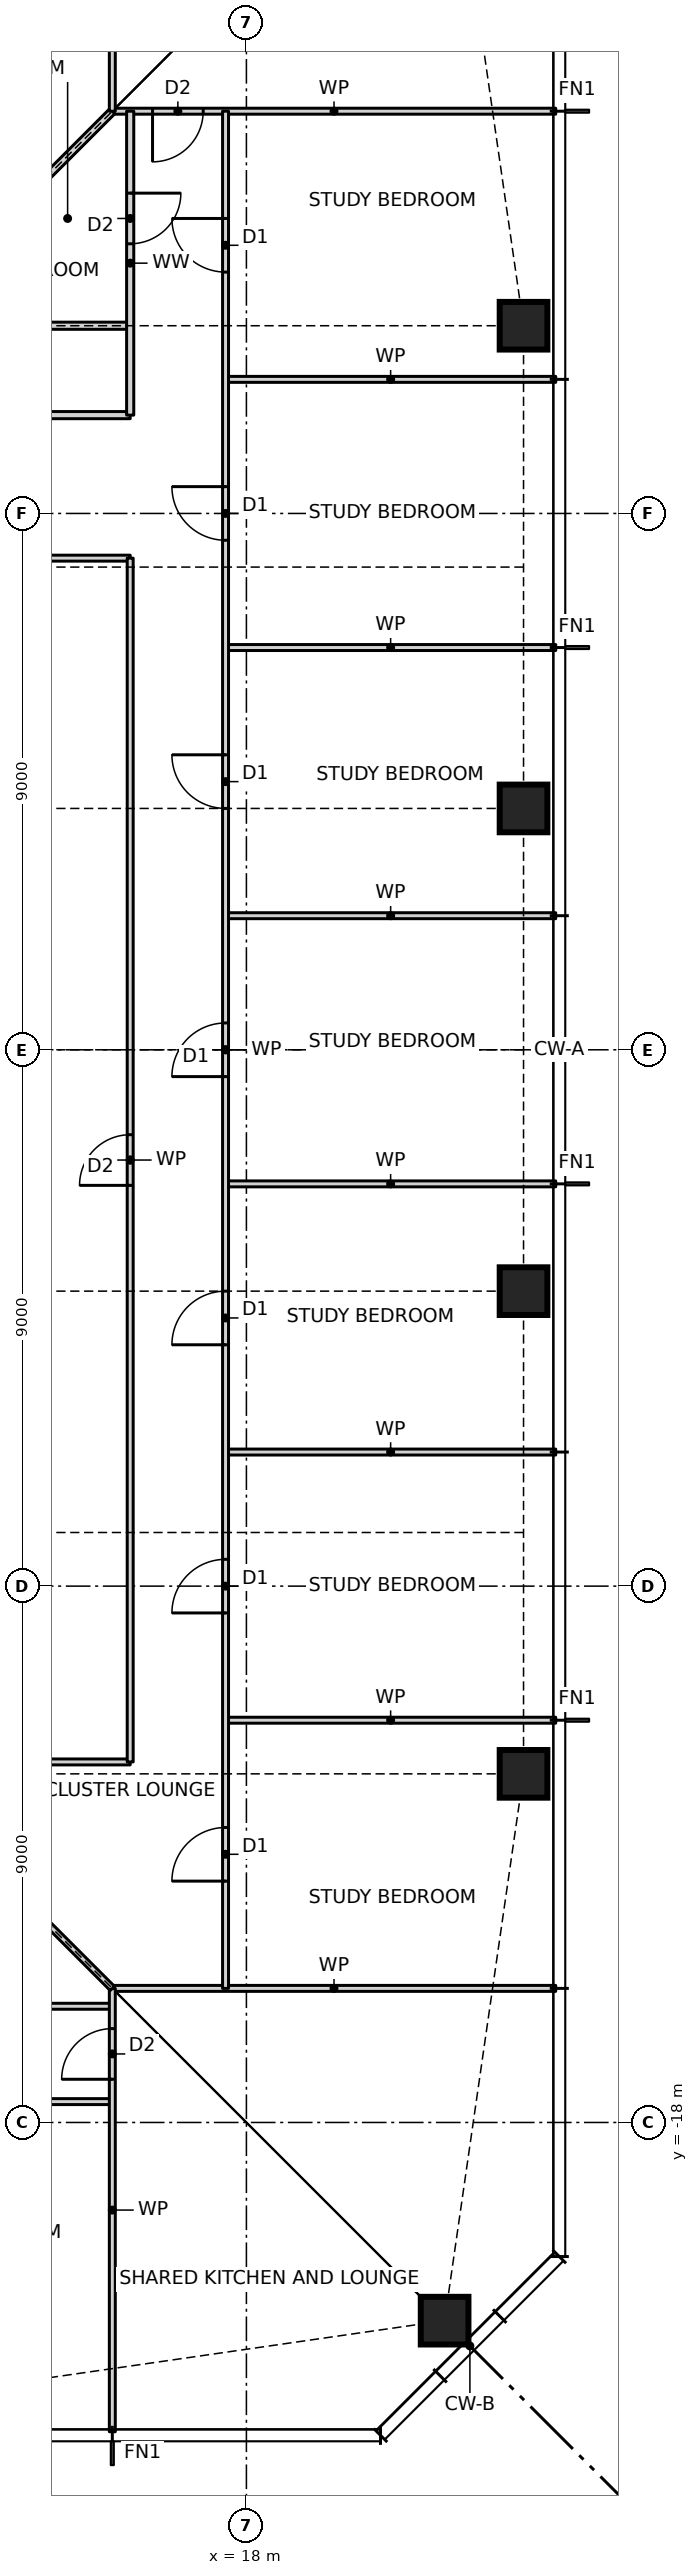
"""IFC4 building model, lengths in metres.
Left out: names, types, materials, properties, quantities, classifications, styles, units other than length and angle.
Written with IfcOpenShell. Run it as: python <this file> out.ifc"""

import sys

from ifc_helpers import new_model, si_unit, direction, frame, frame_2d, origin, origin_2d, place, context, subcontext, project, spatial, rectangle, hollow_rectangle, extrude, element, fill, save


model = new_model("IFC4")
c1 = context("Model", 3, precision=1e-05, world=origin(), true_north=direction((0.0, 1.0)))
c2 = subcontext(c1, "Body", "Model", "MODEL_VIEW")
j1 = project(units=[si_unit("LENGTHUNIT", "METRE"), si_unit("PLANEANGLEUNIT", "RADIAN")], contexts=[c1])
p1 = place(None, origin())
s1 = spatial("IfcSite", under=j1, at=p1, CompositionType="ELEMENT")
p2 = place(p1, origin())
s2 = spatial("IfcBuilding", under=s1, at=p2, CompositionType="ELEMENT")
p3 = place(p2, frame((0.0, 0.0, 18.5)))
s3 = spatial("IfcBuildingStorey", under=s2, at=p3, CompositionType="ELEMENT", Elevation=18.5)
for number, where, z_axis, x_axis in (
    (1, (21.326, -21.326, 0.0), (0.0, 0.0, 1.0), (1.0, 0.0, 0.0)),
    (2, (22.65, -12.15, 0.0), (0.0, 0.0, 1.0), (1.0, 0.0, 0.0)),
    (3, (22.65, -4.05, 0.0), (0.0, 0.0, 1.0), (1.0, 0.0, 0.0)),
    (4, (22.65, 4.05, 0.0), (0.0, 0.0, 1.0), (1.0, 0.0, 0.0)),
    (5, (22.65, 12.15, 0.0), (0.0, 0.0, 1.0), (1.0, 0.0, 0.0)),
):
    element("IfcColumn", number, at=place(p3, frame(where, z_axis=z_axis, x_axis=x_axis)), inside=s3, PredefinedType="COLUMN", context=c2, shape_type="SweptSolid", body=[
        extrude(hollow_rectangle(XDim=0.8, YDim=0.8, WallThickness=0.09, at=origin_2d()), origin(), (0.0, 0.0, 1.0), 3.5),
    ])
p4 = place(p3, frame((-15.75, -17.65, 0.0), z_axis=(0.0, 0.0, 1.0), x_axis=(1.0, 0.0, 0.0)))
e6 = element("IfcWall", 6, at=p4, inside=s3, PredefinedType="PARTITIONING", context=c2, shape_type="SweptSolid", body=[
    extrude(rectangle(XDim=31.5, YDim=0.1, at=frame_2d((15.75, 0.0))), origin(), (0.0, 0.0, 1.0), 3.27),
])
p5 = place(p4, frame((1.8, 0.0, 0.0)))
e7 = element("IfcOpeningElement", 7, at=p5, cuts=e6, PredefinedType="OPENING", context=c2, shape_type="SweptSolid", body=[
    extrude(rectangle(XDim=0.9, YDim=2.1, at=frame_2d((0.45, 1.05))), frame((0.0, 0.06, 0.0), z_axis=(0.0, -1.0, 0.0), x_axis=(1.0, 0.0, 0.0)), (0.0, 0.0, 1.0), 0.12),
])
p6 = place(p4, frame((6.3, 0.0, 0.0)))
e8 = element("IfcOpeningElement", 8, at=p6, cuts=e6, PredefinedType="OPENING", context=c2, shape_type="SweptSolid", body=[
    extrude(rectangle(XDim=0.9, YDim=2.1, at=frame_2d((0.45, 1.05))), frame((0.0, 0.06, 0.0), z_axis=(0.0, -1.0, 0.0), x_axis=(1.0, 0.0, 0.0)), (0.0, 0.0, 1.0), 0.12),
])
p7 = place(p4, frame((10.8, 0.0, 0.0)))
e9 = element("IfcOpeningElement", 9, at=p7, cuts=e6, PredefinedType="OPENING", context=c2, shape_type="SweptSolid", body=[
    extrude(rectangle(XDim=0.9, YDim=2.1, at=frame_2d((0.45, 1.05))), frame((0.0, 0.06, 0.0), z_axis=(0.0, -1.0, 0.0), x_axis=(1.0, 0.0, 0.0)), (0.0, 0.0, 1.0), 0.12),
])
p8 = place(p4, frame((15.3, 0.0, 0.0)))
e10 = element("IfcOpeningElement", 10, at=p8, cuts=e6, PredefinedType="OPENING", context=c2, shape_type="SweptSolid", body=[
    extrude(rectangle(XDim=0.9, YDim=2.1, at=frame_2d((0.45, 1.05))), frame((0.0, 0.06, 0.0), z_axis=(0.0, -1.0, 0.0), x_axis=(1.0, 0.0, 0.0)), (0.0, 0.0, 1.0), 0.12),
])
p9 = place(p4, frame((19.8, 0.0, 0.0)))
e11 = element("IfcOpeningElement", 11, at=p9, cuts=e6, PredefinedType="OPENING", context=c2, shape_type="SweptSolid", body=[
    extrude(rectangle(XDim=0.9, YDim=2.1, at=frame_2d((0.45, 1.05))), frame((0.0, 0.06, 0.0), z_axis=(0.0, -1.0, 0.0), x_axis=(1.0, 0.0, 0.0)), (0.0, 0.0, 1.0), 0.12),
])
p10 = place(p4, frame((24.3, 0.0, 0.0)))
e12 = element("IfcOpeningElement", 12, at=p10, cuts=e6, PredefinedType="OPENING", context=c2, shape_type="SweptSolid", body=[
    extrude(rectangle(XDim=0.9, YDim=2.1, at=frame_2d((0.45, 1.05))), frame((0.0, 0.06, 0.0), z_axis=(0.0, -1.0, 0.0), x_axis=(1.0, 0.0, 0.0)), (0.0, 0.0, 1.0), 0.12),
])
p11 = place(p4, frame((28.8, 0.0, 0.0)))
e13 = element("IfcOpeningElement", 13, at=p11, cuts=e6, PredefinedType="OPENING", context=c2, shape_type="SweptSolid", body=[
    extrude(rectangle(XDim=0.9, YDim=2.1, at=frame_2d((0.45, 1.05))), frame((0.0, 0.06, 0.0), z_axis=(0.0, -1.0, 0.0), x_axis=(1.0, 0.0, 0.0)), (0.0, 0.0, 1.0), 0.12),
])
p12 = place(p3, frame((-2.15, -16.05, 0.0), z_axis=(0.0, 0.0, 1.0), x_axis=(1.0, 0.0, 0.0)))
e14 = element("IfcWall", 14, at=p12, inside=s3, PredefinedType="PARTITIONING", context=c2, shape_type="SweptSolid", body=[
    extrude(rectangle(XDim=17.9, YDim=0.1, at=frame_2d((8.95, 0.0))), origin(), (0.0, 0.0, 1.0), 3.27),
])
p13 = place(p12, frame((8.525, 0.0, 0.0)))
e15 = element("IfcOpeningElement", 15, at=p13, cuts=e14, PredefinedType="OPENING", context=c2, shape_type="SweptSolid", body=[
    extrude(rectangle(XDim=0.85, YDim=2.1, at=frame_2d((0.425, 1.05))), frame((0.0, 0.06, 0.0), z_axis=(0.0, -1.0, 0.0), x_axis=(1.0, 0.0, 0.0)), (0.0, 0.0, 1.0), 0.12),
])
p14 = place(p3, frame((15.75, -15.75, 0.0), z_axis=(0.0, 0.0, 1.0), x_axis=(1.0, 0.0, 0.0)))
e16 = element("IfcWall", 16, at=p14, inside=s3, PredefinedType="PARTITIONING", context=c2, shape_type="SweptSolid", body=[
    extrude(rectangle(XDim=7.44, YDim=0.1, at=frame_2d((3.72, 0.0))), origin(), (0.0, 0.0, 1.0), 3.27),
])
p15 = place(p3, frame((11.95, -11.95, 0.0), z_axis=(0.0, 0.0, 1.0), x_axis=(1.0, 0.0, 0.0)))
e17 = element("IfcWall", 17, at=p15, inside=s3, PredefinedType="PARTITIONING", context=c2, shape_type="SweptSolid", body=[
    extrude(rectangle(XDim=4.1, YDim=0.1, at=frame_2d((2.05, 0.0))), origin(), (0.0, 0.0, 1.0), 3.27),
])
for number, where, z_axis, x_axis in (
    (18, (17.65, -11.25, 0.0), (0.0, 0.0, 1.0), (1.0, 0.0, 0.0)),
    (19, (17.65, -6.75, 0.0), (0.0, 0.0, 1.0), (1.0, 0.0, 0.0)),
    (20, (17.65, -2.25, 0.0), (0.0, 0.0, 1.0), (1.0, 0.0, 0.0)),
    (21, (17.65, 2.25, 0.0), (0.0, 0.0, 1.0), (1.0, 0.0, 0.0)),
    (22, (17.65, 6.75, 0.0), (0.0, 0.0, 1.0), (1.0, 0.0, 0.0)),
):
    element("IfcWall", number, at=place(p3, frame(where, z_axis=z_axis, x_axis=x_axis)), inside=s3, PredefinedType="PARTITIONING", context=c2, shape_type="SweptSolid", body=[
        extrude(rectangle(XDim=5.54, YDim=0.1, at=frame_2d((2.77, 0.0))), origin(), (0.0, 0.0, 1.0), 3.27),
    ])
p16 = place(p3, frame((11.6, 8.25, 0.0), z_axis=(0.0, 0.0, 1.0), x_axis=(1.0, 0.0, 0.0)))
e23 = element("IfcWall", 23, at=p16, inside=s3, PredefinedType="PARTITIONING", context=c2, shape_type="SweptSolid", body=[
    extrude(rectangle(XDim=4.45, YDim=0.1, at=frame_2d((2.225, 0.0))), origin(), (0.0, 0.0, 1.0), 3.27),
])
p17 = place(p3, frame((11.6, 10.65, 0.0), z_axis=(0.0, 0.0, 1.0), x_axis=(1.0, 0.0, 0.0)))
e24 = element("IfcWall", 24, at=p17, inside=s3, PredefinedType="PARTITIONING", context=c2, shape_type="SweptSolid", body=[
    extrude(rectangle(XDim=4.45, YDim=0.12, at=frame_2d((2.225, 0.0))), origin(), (0.0, 0.0, 1.0), 3.27),
])
p18 = place(p17, frame((1.8, 0.0, 0.0)))
e25 = element("IfcOpeningElement", 25, at=p18, cuts=e24, PredefinedType="OPENING", context=c2, shape_type="SweptSolid", body=[
    extrude(rectangle(XDim=0.85, YDim=2.1, at=frame_2d((0.425, 1.05))), frame((0.0, 0.07, 0.0), z_axis=(0.0, -1.0, 0.0), x_axis=(1.0, 0.0, 0.0)), (0.0, 0.0, 1.0), 0.14),
])
p19 = place(p3, frame((17.65, 11.25, 0.0), z_axis=(0.0, 0.0, 1.0), x_axis=(1.0, 0.0, 0.0)))
e26 = element("IfcWall", 26, at=p19, inside=s3, PredefinedType="PARTITIONING", context=c2, shape_type="SweptSolid", body=[
    extrude(rectangle(XDim=5.54, YDim=0.1, at=frame_2d((2.77, 0.0))), origin(), (0.0, 0.0, 1.0), 3.27),
])
p20 = place(p3, frame((12.15, 12.15, 0.0), z_axis=(0.0, 0.0, 1.0), x_axis=(1.0, 0.0, 0.0)))
e27 = element("IfcWall", 27, at=p20, inside=s3, PredefinedType="PARTITIONING", context=c2, shape_type="SweptSolid", body=[
    extrude(rectangle(XDim=3.9, YDim=0.12, at=frame_2d((1.95, 0.0))), origin(), (0.0, 0.0, 1.0), 2.508),
])
p21 = place(p3, frame((15.75, 15.75, 0.0), z_axis=(0.0, 0.0, 1.0), x_axis=(1.0, 0.0, 0.0)))
e28 = element("IfcWall", 28, at=p21, inside=s3, PredefinedType="PARTITIONING", context=c2, shape_type="SweptSolid", body=[
    extrude(rectangle(XDim=7.44, YDim=0.1, at=frame_2d((3.72, 0.0))), origin(), (0.0, 0.0, 1.0), 3.27),
])
p22 = place(p21, frame((0.675, 0.0, 0.0)))
e29 = element("IfcOpeningElement", 29, at=p22, cuts=e28, PredefinedType="OPENING", context=c2, shape_type="SweptSolid", body=[
    extrude(rectangle(XDim=0.85, YDim=2.1, at=frame_2d((0.425, 1.05))), frame((0.0, 0.06, 0.0), z_axis=(0.0, -1.0, 0.0), x_axis=(1.0, 0.0, 0.0)), (0.0, 0.0, 1.0), 0.12),
])
p23 = place(p3, frame((11.6, 11.6, 0.0), z_axis=(0.0, 0.0, 1.0), x_axis=(0.707106781187, 0.707106781187, 0.0)))
e30 = element("IfcWall", 30, at=p23, inside=s3, PredefinedType="PARTITIONING", context=c2, shape_type="SweptSolid", body=[
    extrude(rectangle(XDim=5.869, YDim=0.12, at=frame_2d((2.935, 0.0))), origin(), (0.0, 0.0, 1.0), 2.343),
])
p24 = place(p3, frame((17.65, -15.75, 0.0), z_axis=(0.0, 0.0, 1.0), x_axis=(0.0, 1.0, 0.0)))
e31 = element("IfcWall", 31, at=p24, inside=s3, PredefinedType="PARTITIONING", context=c2, shape_type="SweptSolid", body=[
    extrude(rectangle(XDim=31.5, YDim=0.1, at=frame_2d((15.75, 0.0))), origin(), (0.0, 0.0, 1.0), 3.27),
])
p25 = place(p24, frame((1.8, 0.0, 0.0)))
e32 = element("IfcOpeningElement", 32, at=p25, cuts=e31, PredefinedType="OPENING", context=c2, shape_type="SweptSolid", body=[
    extrude(rectangle(XDim=0.9, YDim=2.1, at=frame_2d((0.45, 1.05))), frame((0.0, 0.06, 0.0), z_axis=(0.0, -1.0, 0.0), x_axis=(1.0, 0.0, 0.0)), (0.0, 0.0, 1.0), 0.12),
])
p26 = place(p24, frame((6.3, 0.0, 0.0)))
e33 = element("IfcOpeningElement", 33, at=p26, cuts=e31, PredefinedType="OPENING", context=c2, shape_type="SweptSolid", body=[
    extrude(rectangle(XDim=0.9, YDim=2.1, at=frame_2d((0.45, 1.05))), frame((0.0, 0.06, 0.0), z_axis=(0.0, -1.0, 0.0), x_axis=(1.0, 0.0, 0.0)), (0.0, 0.0, 1.0), 0.12),
])
p27 = place(p24, frame((10.8, 0.0, 0.0)))
e34 = element("IfcOpeningElement", 34, at=p27, cuts=e31, PredefinedType="OPENING", context=c2, shape_type="SweptSolid", body=[
    extrude(rectangle(XDim=0.9, YDim=2.1, at=frame_2d((0.45, 1.05))), frame((0.0, 0.06, 0.0), z_axis=(0.0, -1.0, 0.0), x_axis=(1.0, 0.0, 0.0)), (0.0, 0.0, 1.0), 0.12),
])
p28 = place(p24, frame((15.3, 0.0, 0.0)))
e35 = element("IfcOpeningElement", 35, at=p28, cuts=e31, PredefinedType="OPENING", context=c2, shape_type="SweptSolid", body=[
    extrude(rectangle(XDim=0.9, YDim=2.1, at=frame_2d((0.45, 1.05))), frame((0.0, 0.06, 0.0), z_axis=(0.0, -1.0, 0.0), x_axis=(1.0, 0.0, 0.0)), (0.0, 0.0, 1.0), 0.12),
])
p29 = place(p24, frame((19.8, 0.0, 0.0)))
e36 = element("IfcOpeningElement", 36, at=p29, cuts=e31, PredefinedType="OPENING", context=c2, shape_type="SweptSolid", body=[
    extrude(rectangle(XDim=0.9, YDim=2.1, at=frame_2d((0.45, 1.05))), frame((0.0, 0.06, 0.0), z_axis=(0.0, -1.0, 0.0), x_axis=(1.0, 0.0, 0.0)), (0.0, 0.0, 1.0), 0.12),
])
p30 = place(p24, frame((24.3, 0.0, 0.0)))
e37 = element("IfcOpeningElement", 37, at=p30, cuts=e31, PredefinedType="OPENING", context=c2, shape_type="SweptSolid", body=[
    extrude(rectangle(XDim=0.9, YDim=2.1, at=frame_2d((0.45, 1.05))), frame((0.0, 0.06, 0.0), z_axis=(0.0, -1.0, 0.0), x_axis=(1.0, 0.0, 0.0)), (0.0, 0.0, 1.0), 0.12),
])
p31 = place(p24, frame((28.8, 0.0, 0.0)))
e38 = element("IfcOpeningElement", 38, at=p31, cuts=e31, PredefinedType="OPENING", context=c2, shape_type="SweptSolid", body=[
    extrude(rectangle(XDim=0.9, YDim=2.1, at=frame_2d((0.45, 1.05))), frame((0.0, 0.06, 0.0), z_axis=(0.0, -1.0, 0.0), x_axis=(1.0, 0.0, 0.0)), (0.0, 0.0, 1.0), 0.12),
])
p32 = place(p3, frame((16.05, -11.95, 0.0), z_axis=(0.0, 0.0, 1.0), x_axis=(0.0, 1.0, 0.0)))
e39 = element("IfcWall", 39, at=p32, inside=s3, PredefinedType="PARTITIONING", context=c2, shape_type="SweptSolid", body=[
    extrude(rectangle(XDim=20.2, YDim=0.1, at=frame_2d((10.1, 0.0))), origin(), (0.0, 0.0, 1.0), 3.27),
])
p33 = place(p32, frame((9.675, 0.0, 0.0)))
e40 = element("IfcOpeningElement", 40, at=p33, cuts=e39, PredefinedType="OPENING", context=c2, shape_type="SweptSolid", body=[
    extrude(rectangle(XDim=0.85, YDim=2.1, at=frame_2d((0.425, 1.05))), frame((0.0, 0.06, 0.0), z_axis=(0.0, -1.0, 0.0), x_axis=(1.0, 0.0, 0.0)), (0.0, 0.0, 1.0), 0.12),
])
p34 = place(p3, frame((16.05, 10.65, 0.0), z_axis=(0.0, 0.0, 1.0), x_axis=(0.0, 1.0, 0.0)))
e41 = element("IfcWall", 41, at=p34, inside=s3, PredefinedType="PARTITIONING", context=c2, shape_type="SweptSolid", body=[
    extrude(rectangle(XDim=5.1, YDim=0.12, at=frame_2d((2.55, 0.0))), origin(), (0.0, 0.0, 1.0), 3.27),
])
p35 = place(p34, frame((2.875, 0.0, 0.0)))
e42 = element("IfcOpeningElement", 42, at=p35, cuts=e41, PredefinedType="OPENING", context=c2, shape_type="SweptSolid", body=[
    extrude(rectangle(XDim=0.85, YDim=2.1, at=frame_2d((0.425, 1.05))), frame((0.0, 0.07, 0.0), z_axis=(0.0, -1.0, 0.0), x_axis=(1.0, 0.0, 0.0)), (0.0, 0.0, 1.0), 0.14),
])
p36 = place(p3, frame((15.75, -23.19, 0.0), z_axis=(0.0, 0.0, 1.0), x_axis=(0.0, 1.0, 0.0)))
e43 = element("IfcWall", 43, at=p36, inside=s3, PredefinedType="PARTITIONING", context=c2, shape_type="SweptSolid", body=[
    extrude(rectangle(XDim=7.44, YDim=0.1, at=frame_2d((3.72, 0.0))), origin(), (0.0, 0.0, 1.0), 3.27),
])
p37 = place(p36, frame((5.915, 0.0, 0.0)))
e44 = element("IfcOpeningElement", 44, at=p37, cuts=e43, PredefinedType="OPENING", context=c2, shape_type="SweptSolid", body=[
    extrude(rectangle(XDim=0.85, YDim=2.1, at=frame_2d((0.425, 1.05))), frame((0.0, 0.06, 0.0), z_axis=(0.0, -1.0, 0.0), x_axis=(1.0, 0.0, 0.0)), (0.0, 0.0, 1.0), 0.12),
])
p38 = place(p3, frame((15.75, 15.75, 0.0), z_axis=(0.0, 0.0, 1.0), x_axis=(0.0, 1.0, 0.0)))
e45 = element("IfcWall", 45, at=p38, inside=s3, PredefinedType="PARTITIONING", context=c2, shape_type="SweptSolid", body=[
    extrude(rectangle(XDim=7.44, YDim=0.1, at=frame_2d((3.72, 0.0))), origin(), (0.0, 0.0, 1.0), 3.27),
])
p39 = place(p3, frame((15.75, -15.75, 0.0), z_axis=(0.0, 0.0, 1.0), x_axis=(-0.707106781187, 0.707106781187, 0.0)))
e46 = element("IfcWall", 46, at=p39, inside=s3, PredefinedType="PARTITIONING", context=c2, shape_type="SweptSolid", body=[
    extrude(rectangle(XDim=5.869, YDim=0.1, at=frame_2d((2.935, 0.0))), origin(), (0.0, 0.0, 1.0), 2.343),
])
p40 = place(p25, origin())
e47 = element("IfcDoor", 47, at=p40, inside=s3, OperationType="SINGLE_SWING_LEFT", PredefinedType="DOOR", context=c2, shape_type="SweptSolid", body=[
    extrude(rectangle(XDim=0.9, YDim=2.1, at=frame_2d((0.45, 1.05))), frame((0.0, 0.025, 0.0), z_axis=(0.0, -1.0, 0.0), x_axis=(1.0, 0.0, 0.0)), (0.0, 0.0, 1.0), 0.05),
])
fill(e32, e47)
p41 = place(p26, origin())
e48 = element("IfcDoor", 48, at=p41, inside=s3, OperationType="SINGLE_SWING_LEFT", PredefinedType="DOOR", context=c2, shape_type="SweptSolid", body=[
    extrude(rectangle(XDim=0.9, YDim=2.1, at=frame_2d((0.45, 1.05))), frame((0.0, 0.025, 0.0), z_axis=(0.0, -1.0, 0.0), x_axis=(1.0, 0.0, 0.0)), (0.0, 0.0, 1.0), 0.05),
])
fill(e33, e48)
p42 = place(p27, origin())
e49 = element("IfcDoor", 49, at=p42, inside=s3, OperationType="SINGLE_SWING_LEFT", PredefinedType="DOOR", context=c2, shape_type="SweptSolid", body=[
    extrude(rectangle(XDim=0.9, YDim=2.1, at=frame_2d((0.45, 1.05))), frame((0.0, 0.025, 0.0), z_axis=(0.0, -1.0, 0.0), x_axis=(1.0, 0.0, 0.0)), (0.0, 0.0, 1.0), 0.05),
])
fill(e34, e49)
p43 = place(p28, origin())
e50 = element("IfcDoor", 50, at=p43, inside=s3, OperationType="SINGLE_SWING_LEFT", PredefinedType="DOOR", context=c2, shape_type="SweptSolid", body=[
    extrude(rectangle(XDim=0.9, YDim=2.1, at=frame_2d((0.45, 1.05))), frame((0.0, 0.025, 0.0), z_axis=(0.0, -1.0, 0.0), x_axis=(1.0, 0.0, 0.0)), (0.0, 0.0, 1.0), 0.05),
])
fill(e35, e50)
p44 = place(p29, origin())
e51 = element("IfcDoor", 51, at=p44, inside=s3, OperationType="SINGLE_SWING_RIGHT", PredefinedType="DOOR", context=c2, shape_type="SweptSolid", body=[
    extrude(rectangle(XDim=0.9, YDim=2.1, at=frame_2d((0.45, 1.05))), frame((0.0, 0.025, 0.0), z_axis=(0.0, -1.0, 0.0), x_axis=(1.0, 0.0, 0.0)), (0.0, 0.0, 1.0), 0.05),
])
fill(e36, e51)
p45 = place(p30, origin())
e52 = element("IfcDoor", 52, at=p45, inside=s3, OperationType="SINGLE_SWING_RIGHT", PredefinedType="DOOR", context=c2, shape_type="SweptSolid", body=[
    extrude(rectangle(XDim=0.9, YDim=2.1, at=frame_2d((0.45, 1.05))), frame((0.0, 0.025, 0.0), z_axis=(0.0, -1.0, 0.0), x_axis=(1.0, 0.0, 0.0)), (0.0, 0.0, 1.0), 0.05),
])
fill(e37, e52)
p46 = place(p31, origin())
e53 = element("IfcDoor", 53, at=p46, inside=s3, OperationType="SINGLE_SWING_RIGHT", PredefinedType="DOOR", context=c2, shape_type="SweptSolid", body=[
    extrude(rectangle(XDim=0.9, YDim=2.1, at=frame_2d((0.45, 1.05))), frame((0.0, 0.025, 0.0), z_axis=(0.0, -1.0, 0.0), x_axis=(1.0, 0.0, 0.0)), (0.0, 0.0, 1.0), 0.05),
])
fill(e38, e53)
p47 = place(p33, origin())
e54 = element("IfcDoor", 54, at=p47, inside=s3, OperationType="SINGLE_SWING_LEFT", PredefinedType="DOOR", context=c2, shape_type="SweptSolid", body=[
    extrude(rectangle(XDim=0.85, YDim=2.1, at=frame_2d((0.425, 1.05))), frame((0.0, 0.025, 0.0), z_axis=(0.0, -1.0, 0.0), x_axis=(1.0, 0.0, 0.0)), (0.0, 0.0, 1.0), 0.05),
])
fill(e40, e54)
p48 = place(p35, frame((0.85, 0.0, 0.0), z_axis=(0.0, 0.0, 1.0), x_axis=(-1.0, 0.0, 0.0)))
e55 = element("IfcDoor", 55, at=p48, inside=s3, OperationType="SINGLE_SWING_LEFT", PredefinedType="DOOR", context=c2, shape_type="SweptSolid", body=[
    extrude(rectangle(XDim=0.85, YDim=2.1, at=frame_2d((0.425, 1.05))), frame((0.0, 0.025, 0.0), z_axis=(0.0, -1.0, 0.0), x_axis=(1.0, 0.0, 0.0)), (0.0, 0.0, 1.0), 0.05),
])
fill(e42, e55)
p49 = place(p37, origin())
e56 = element("IfcDoor", 56, at=p49, inside=s3, OperationType="SINGLE_SWING_LEFT", PredefinedType="DOOR", context=c2, shape_type="SweptSolid", body=[
    extrude(rectangle(XDim=0.85, YDim=2.1, at=frame_2d((0.425, 1.05))), frame((0.0, 0.025, 0.0), z_axis=(0.0, -1.0, 0.0), x_axis=(1.0, 0.0, 0.0)), (0.0, 0.0, 1.0), 0.05),
])
fill(e44, e56)
p50 = place(p22, frame((0.85, 0.0, 0.0), z_axis=(0.0, 0.0, 1.0), x_axis=(-1.0, 0.0, 0.0)))
e57 = element("IfcDoor", 57, at=p50, inside=s3, OperationType="SINGLE_SWING_RIGHT", PredefinedType="DOOR", context=c2, shape_type="SweptSolid", body=[
    extrude(rectangle(XDim=0.85, YDim=2.1, at=frame_2d((0.425, 1.05))), frame((0.0, 0.025, 0.0), z_axis=(0.0, -1.0, 0.0), x_axis=(1.0, 0.0, 0.0)), (0.0, 0.0, 1.0), 0.05),
])
fill(e29, e57)
save(model, sys.argv[1])
